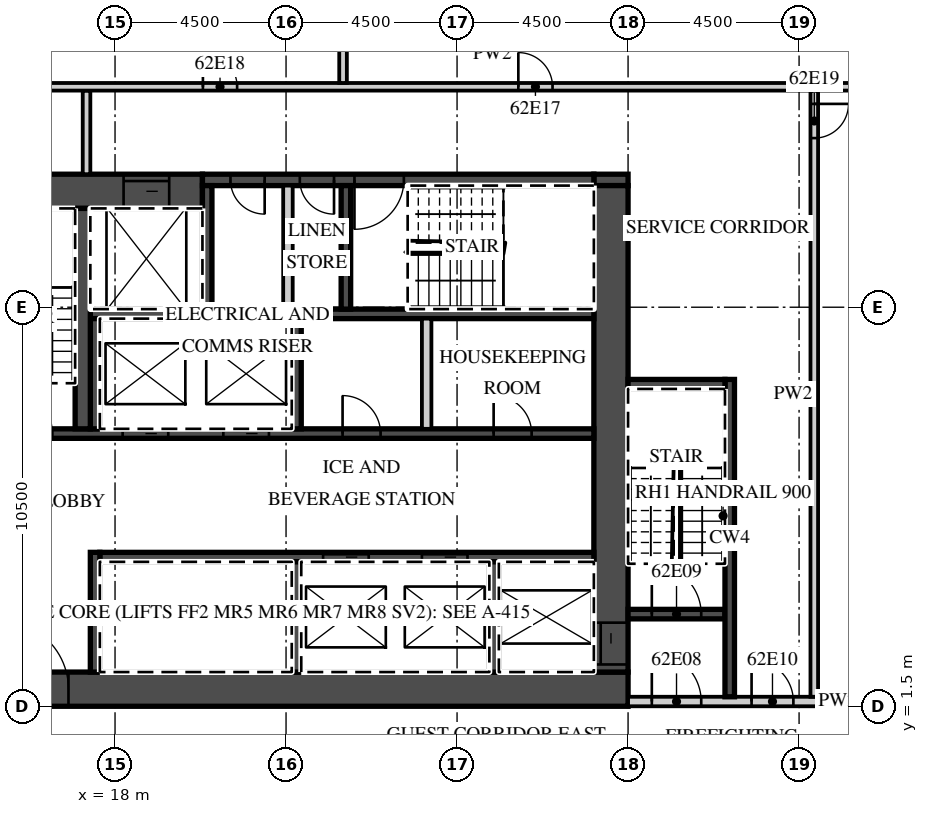
"""IFC4 building model, lengths in metres.
Left out: names, types, materials, properties, quantities, classifications, styles, units other than length and angle.
Written with IfcOpenShell. Run it as: python <this file> out.ifc"""

import sys

from ifc_helpers import new_model, si_unit, direction, frame, frame_2d, origin, place, context, subcontext, project, spatial, rectangle, extrude, element, fill, save


model = new_model("IFC4")
c1 = context("Model", 3, precision=1e-05, world=origin(), true_north=direction((0.0, 1.0)))
c2 = subcontext(c1, "Body", "Model", "MODEL_VIEW")
j1 = project(units=[si_unit("LENGTHUNIT", "METRE"), si_unit("PLANEANGLEUNIT", "RADIAN")], contexts=[c1])
p1 = place(None, origin())
s1 = spatial("IfcSite", under=j1, at=p1, CompositionType="ELEMENT")
p2 = place(p1, origin())
s2 = spatial("IfcBuilding", under=s1, at=p2, CompositionType="ELEMENT")
p3 = place(p2, frame((0.0, 0.0, 250.7)))
s3 = spatial("IfcBuildingStorey", under=s2, at=p3, CompositionType="ELEMENT", Elevation=250.7)
p4 = place(p3, frame((13.5, 1.95, 0.0), z_axis=(0.0, 0.0, 1.0), x_axis=(1.0, 0.0, 0.0)))
e1 = element("IfcWall", 1, at=p4, inside=s3, PredefinedType="SHEAR", context=c2, shape_type="SweptSolid", body=[
    extrude(rectangle(XDim=18.0, YDim=0.9, at=frame_2d((9.0, 0.0))), origin(), (0.0, 0.0, 1.0), 3.02),
])
p5 = place(p4, frame((1.475, 0.0, 0.0)))
e2 = element("IfcOpeningElement", 2, at=p5, cuts=e1, PredefinedType="OPENING", context=c2, shape_type="SweptSolid", body=[
    extrude(rectangle(XDim=1.8, YDim=2.1, at=frame_2d((0.9, 1.05))), frame((0.0, 0.46, 0.0), z_axis=(0.0, -1.0, 0.0), x_axis=(1.0, 0.0, 0.0)), (0.0, 0.0, 1.0), 0.92),
])
p6 = place(p3, frame((13.5, 15.05, 0.0), z_axis=(0.0, 0.0, 1.0), x_axis=(1.0, 0.0, 0.0)))
e3 = element("IfcWall", 3, at=p6, inside=s3, PredefinedType="SHEAR", context=c2, shape_type="SweptSolid", body=[
    extrude(rectangle(XDim=6.8, YDim=0.9, at=frame_2d((3.4, 0.0))), origin(), (0.0, 0.0, 1.0), 3.02),
])
p7 = place(p6, frame((4.725, 0.0, 0.0)))
e4 = element("IfcOpeningElement", 4, at=p7, cuts=e3, PredefinedType="OPENING", context=c2, shape_type="SweptSolid", body=[
    extrude(rectangle(XDim=1.2, YDim=2.1, at=frame_2d((0.6, 1.05))), frame((0.0, 0.46, 0.0), z_axis=(0.0, -1.0, 0.0), x_axis=(1.0, 0.0, 0.0)), (0.0, 0.0, 1.0), 0.92),
])
p8 = place(p3, frame((30.6, 15.35, 0.0), z_axis=(0.0, 0.0, 1.0), x_axis=(1.0, 0.0, 0.0)))
e5 = element("IfcWall", 5, at=p8, inside=s3, PredefinedType="SHEAR", context=c2, shape_type="SweptSolid", body=[
    extrude(rectangle(XDim=0.9, YDim=0.3, at=frame_2d((0.45, 0.0))), origin(), (0.0, 0.0, 1.0), 3.02),
])
p9 = place(p3, frame((20.3, 15.35, 0.0), z_axis=(0.0, 0.0, 1.0), x_axis=(1.0, 0.0, 0.0)))
e6 = element("IfcWall", 6, at=p9, inside=s3, PredefinedType="SHEAR", context=c2, shape_type="SweptSolid", body=[
    extrude(rectangle(XDim=10.3, YDim=0.3, at=frame_2d((5.15, 0.0))), origin(), (0.0, 0.0, 1.0), 3.02),
])
p10 = place(p9, frame((4.0, 0.0, 0.0)))
e7 = element("IfcOpeningElement", 7, at=p10, cuts=e6, PredefinedType="OPENING", context=c2, shape_type="SweptSolid", body=[
    extrude(rectangle(XDim=1.3, YDim=2.1, at=frame_2d((0.65, 1.05))), frame((0.0, 0.16, 0.0), z_axis=(0.0, -1.0, 0.0), x_axis=(1.0, 0.0, 0.0)), (0.0, 0.0, 1.0), 0.32),
])
p11 = place(p9, frame((2.562, 0.0, 0.0)))
e8 = element("IfcOpeningElement", 8, at=p11, cuts=e6, PredefinedType="OPENING", context=c2, shape_type="SweptSolid", body=[
    extrude(rectangle(XDim=0.9, YDim=2.1, at=frame_2d((0.45, 1.05))), frame((0.0, 0.16, 0.0), z_axis=(0.0, -1.0, 0.0), x_axis=(1.0, 0.0, 0.0)), (0.0, 0.0, 1.0), 0.32),
])
p12 = place(p9, frame((0.738, 0.0, 0.0)))
e9 = element("IfcOpeningElement", 9, at=p12, cuts=e6, PredefinedType="OPENING", context=c2, shape_type="SweptSolid", body=[
    extrude(rectangle(XDim=0.9, YDim=2.1, at=frame_2d((0.45, 1.05))), frame((0.0, 0.16, 0.0), z_axis=(0.0, -1.0, 0.0), x_axis=(1.0, 0.0, 0.0)), (0.0, 0.0, 1.0), 0.32),
])
p13 = place(p3, frame((31.05, 2.4, 0.0), z_axis=(0.0, 0.0, 1.0), x_axis=(0.0, 1.0, 0.0)))
e10 = element("IfcWall", 10, at=p13, inside=s3, PredefinedType="SHEAR", context=c2, shape_type="SweptSolid", body=[
    extrude(rectangle(XDim=12.8, YDim=0.9, at=frame_2d((6.4, 0.0))), origin(), (0.0, 0.0, 1.0), 3.02),
])
p14 = place(p13, frame((0.2, 0.0, 0.0)))
e11 = element("IfcOpeningElement", 11, at=p14, cuts=e10, PredefinedType="OPENING", context=c2, shape_type="SweptSolid", body=[
    extrude(rectangle(XDim=1.1, YDim=2.1, at=frame_2d((0.55, 1.05))), frame((0.0, 0.46, 0.0), z_axis=(0.0, -1.0, 0.0), x_axis=(1.0, 0.0, 0.0)), (0.0, 0.0, 1.0), 0.92),
])
p15 = place(p3, frame((17.6, 5.425, 0.0), z_axis=(0.0, 0.0, 1.0), x_axis=(1.0, 0.0, 0.0)))
e12 = element("IfcWall", 12, at=p15, inside=s3, PredefinedType="SHEAR", context=c2, shape_type="SweptSolid", body=[
    extrude(rectangle(XDim=13.0, YDim=0.25, at=frame_2d((6.5, 0.0))), origin(), (0.0, 0.0, 1.0), 3.02),
])
p16 = place(p15, frame((8.475, 0.0, 0.0)))
e13 = element("IfcOpeningElement", 13, at=p16, cuts=e12, PredefinedType="OPENING", context=c2, shape_type="SweptSolid", body=[
    extrude(rectangle(XDim=1.2, YDim=2.1, at=frame_2d((0.6, 1.05))), frame((0.0, 0.135, 0.0), z_axis=(0.0, -1.0, 0.0), x_axis=(1.0, 0.0, 0.0)), (0.0, 0.0, 1.0), 0.27),
])
p17 = place(p15, frame((5.875, 0.0, 0.0)))
e14 = element("IfcOpeningElement", 14, at=p17, cuts=e12, PredefinedType="OPENING", context=c2, shape_type="SweptSolid", body=[
    extrude(rectangle(XDim=1.2, YDim=2.1, at=frame_2d((0.6, 1.05))), frame((0.0, 0.135, 0.0), z_axis=(0.0, -1.0, 0.0), x_axis=(1.0, 0.0, 0.0)), (0.0, 0.0, 1.0), 0.27),
])
p18 = place(p3, frame((17.475, 2.4, 0.0), z_axis=(0.0, 0.0, 1.0), x_axis=(0.0, 1.0, 0.0)))
e15 = element("IfcWall", 15, at=p18, inside=s3, PredefinedType="SHEAR", context=c2, shape_type="SweptSolid", body=[
    extrude(rectangle(XDim=3.15, YDim=0.25, at=frame_2d((1.575, 0.0))), origin(), (0.0, 0.0, 1.0), 3.02),
])
for number, where, z_axis, x_axis in (
    (16, (27.975, 2.4, 0.0), (0.0, 0.0, 1.0), (0.0, 1.0, 0.0)),
    (17, (22.775, 2.4, 0.0), (0.0, 0.0, 1.0), (0.0, 1.0, 0.0)),
):
    element("IfcWall", number, at=place(p3, frame(where, z_axis=z_axis, x_axis=x_axis)), inside=s3, PredefinedType="SHEAR", context=c2, shape_type="SweptSolid", body=[
        extrude(rectangle(XDim=2.9, YDim=0.25, at=frame_2d((1.45, 0.0))), origin(), (0.0, 0.0, 1.0), 3.02),
    ])
p19 = place(p3, frame((14.4, 8.675, 0.0), z_axis=(0.0, 0.0, 1.0), x_axis=(1.0, 0.0, 0.0)))
e18 = element("IfcWall", 18, at=p19, inside=s3, PredefinedType="SHEAR", context=c2, shape_type="SweptSolid", body=[
    extrude(rectangle(XDim=16.2, YDim=0.25, at=frame_2d((8.1, 0.0))), origin(), (0.0, 0.0, 1.0), 3.02),
])
p20 = place(p19, frame((6.45, 0.0, 0.0)))
e19 = element("IfcOpeningElement", 19, at=p20, cuts=e18, PredefinedType="OPENING", context=c2, shape_type="SweptSolid", body=[
    extrude(rectangle(XDim=1.2, YDim=2.1, at=frame_2d((0.6, 1.05))), frame((0.0, 0.135, 0.0), z_axis=(0.0, -1.0, 0.0), x_axis=(1.0, 0.0, 0.0)), (0.0, 0.0, 1.0), 0.27),
])
p21 = place(p19, frame((3.8, 0.0, 0.0)))
e20 = element("IfcOpeningElement", 20, at=p21, cuts=e18, PredefinedType="OPENING", context=c2, shape_type="SweptSolid", body=[
    extrude(rectangle(XDim=1.2, YDim=2.1, at=frame_2d((0.6, 1.05))), frame((0.0, 0.135, 0.0), z_axis=(0.0, -1.0, 0.0), x_axis=(1.0, 0.0, 0.0)), (0.0, 0.0, 1.0), 0.27),
])
p22 = place(p19, frame((0.65, 0.0, 0.0)))
e21 = element("IfcOpeningElement", 21, at=p22, cuts=e18, PredefinedType="OPENING", context=c2, shape_type="SweptSolid", body=[
    extrude(rectangle(XDim=1.3, YDim=2.1, at=frame_2d((0.65, 1.05))), frame((0.0, 0.135, 0.0), z_axis=(0.0, -1.0, 0.0), x_axis=(1.0, 0.0, 0.0)), (0.0, 0.0, 1.0), 0.27),
])
p23 = place(p19, frame((13.562, 0.0, 0.0)))
e22 = element("IfcOpeningElement", 22, at=p23, cuts=e18, PredefinedType="OPENING", context=c2, shape_type="SweptSolid", body=[
    extrude(rectangle(XDim=1.0, YDim=2.1, at=frame_2d((0.5, 1.05))), frame((0.0, 0.135, 0.0), z_axis=(0.0, -1.0, 0.0), x_axis=(1.0, 0.0, 0.0)), (0.0, 0.0, 1.0), 0.27),
])
p24 = place(p19, frame((9.587, 0.0, 0.0)))
e23 = element("IfcOpeningElement", 23, at=p24, cuts=e18, PredefinedType="OPENING", context=c2, shape_type="SweptSolid", body=[
    extrude(rectangle(XDim=1.0, YDim=2.1, at=frame_2d((0.5, 1.05))), frame((0.0, 0.135, 0.0), z_axis=(0.0, -1.0, 0.0), x_axis=(1.0, 0.0, 0.0)), (0.0, 0.0, 1.0), 0.27),
])
p25 = place(p3, frame((17.35, 11.825, 0.0), z_axis=(0.0, 0.0, 1.0), x_axis=(1.0, 0.0, 0.0)))
e24 = element("IfcWall", 24, at=p25, inside=s3, PredefinedType="SHEAR", context=c2, shape_type="SweptSolid", body=[
    extrude(rectangle(XDim=13.25, YDim=0.25, at=frame_2d((6.625, 0.0))), origin(), (0.0, 0.0, 1.0), 3.02),
])
for number, where, z_axis, x_axis in (
    (25, (17.475, 8.8, 0.0), (0.0, 0.0, 1.0), (0.0, 1.0, 0.0)),
    (26, (22.775, 8.8, 0.0), (0.0, 0.0, 1.0), (0.0, 1.0, 0.0)),
):
    element("IfcWall", number, at=place(p3, frame(where, z_axis=z_axis, x_axis=x_axis)), inside=s3, PredefinedType="SHEAR", context=c2, shape_type="SweptSolid", body=[
        extrude(rectangle(XDim=2.9, YDim=0.25, at=frame_2d((1.45, 0.0))), origin(), (0.0, 0.0, 1.0), 3.02),
    ])
p26 = place(p3, frame((26.2, 8.8, 0.0), z_axis=(0.0, 0.0, 1.0), x_axis=(0.0, 1.0, 0.0)))
e27 = element("IfcWall", 27, at=p26, inside=s3, PredefinedType="PARTITIONING", context=c2, shape_type="SweptSolid", body=[
    extrude(rectangle(XDim=2.9, YDim=0.25, at=frame_2d((1.45, 0.0))), origin(), (0.0, 0.0, 1.0), 3.02),
])
p27 = place(p3, frame((17.15, 8.8, 0.0), z_axis=(0.0, 0.0, 1.0), x_axis=(0.0, 1.0, 0.0)))
e28 = element("IfcWall", 28, at=p27, inside=s3, PredefinedType="SHEAR", context=c2, shape_type="SweptSolid", body=[
    extrude(rectangle(XDim=5.8, YDim=0.4, at=frame_2d((2.9, 0.0))), origin(), (0.0, 0.0, 1.0), 3.02),
])
for number, where, z_axis, x_axis in (
    (29, (20.425, 11.95, 0.0), (0.0, 0.0, 1.0), (0.0, 1.0, 0.0)),
    (30, (24.075, 11.95, 0.0), (0.0, 0.0, 1.0), (0.0, 1.0, 0.0)),
):
    element("IfcWall", number, at=place(p3, frame(where, z_axis=z_axis, x_axis=x_axis)), inside=s3, PredefinedType="SHEAR", context=c2, shape_type="SweptSolid", body=[
        extrude(rectangle(XDim=3.25, YDim=0.25, at=frame_2d((1.625, 0.0))), origin(), (0.0, 0.0, 1.0), 3.02),
    ])
p28 = place(p3, frame((22.55, 11.95, 0.0), z_axis=(0.0, 0.0, 1.0), x_axis=(0.0, 1.0, 0.0)))
e31 = element("IfcWall", 31, at=p28, inside=s3, PredefinedType="PARTITIONING", context=c2, shape_type="SweptSolid", body=[
    extrude(rectangle(XDim=3.25, YDim=0.25, at=frame_2d((1.625, 0.0))), origin(), (0.0, 0.0, 1.0), 3.02),
])
p29 = place(p3, frame((31.5, 1.625, 0.0), z_axis=(0.0, 0.0, 1.0), x_axis=(1.0, 0.0, 0.0)))
e32 = element("IfcWall", 32, at=p29, inside=s3, PredefinedType="PARTITIONING", context=c2, shape_type="SweptSolid", body=[
    extrude(rectangle(XDim=11.04, YDim=0.25, at=frame_2d((5.52, 0.0))), origin(), (0.0, 0.0, 1.0), 3.02),
])
p30 = place(p29, frame((0.625, 0.0, 0.0)))
e33 = element("IfcOpeningElement", 33, at=p30, cuts=e32, PredefinedType="OPENING", context=c2, shape_type="SweptSolid", body=[
    extrude(rectangle(XDim=1.3, YDim=2.1, at=frame_2d((0.65, 1.05))), frame((0.0, 0.135, 0.0), z_axis=(0.0, -1.0, 0.0), x_axis=(1.0, 0.0, 0.0)), (0.0, 0.0, 1.0), 0.27),
])
p31 = place(p29, frame((3.25, 0.0, 0.0)))
e34 = element("IfcOpeningElement", 34, at=p31, cuts=e32, PredefinedType="OPENING", context=c2, shape_type="SweptSolid", body=[
    extrude(rectangle(XDim=1.1, YDim=2.1, at=frame_2d((0.55, 1.05))), frame((0.0, 0.135, 0.0), z_axis=(0.0, -1.0, 0.0), x_axis=(1.0, 0.0, 0.0)), (0.0, 0.0, 1.0), 0.27),
])
p32 = place(p3, frame((31.5, 3.925, 0.0), z_axis=(0.0, 0.0, 1.0), x_axis=(1.0, 0.0, 0.0)))
e35 = element("IfcWall", 35, at=p32, inside=s3, PredefinedType="SHEAR", context=c2, shape_type="SweptSolid", body=[
    extrude(rectangle(XDim=2.55, YDim=0.25, at=frame_2d((1.275, 0.0))), origin(), (0.0, 0.0, 1.0), 3.02),
])
p33 = place(p32, frame((0.625, 0.0, 0.0)))
e36 = element("IfcOpeningElement", 36, at=p33, cuts=e35, PredefinedType="OPENING", context=c2, shape_type="SweptSolid", body=[
    extrude(rectangle(XDim=1.3, YDim=2.1, at=frame_2d((0.65, 1.05))), frame((0.0, 0.135, 0.0), z_axis=(0.0, -1.0, 0.0), x_axis=(1.0, 0.0, 0.0)), (0.0, 0.0, 1.0), 0.27),
])
p34 = place(p3, frame((34.175, 1.75, 0.0), z_axis=(0.0, 0.0, 1.0), x_axis=(0.0, 1.0, 0.0)))
e37 = element("IfcWall", 37, at=p34, inside=s3, PredefinedType="SHEAR", context=c2, shape_type="SweptSolid", body=[
    extrude(rectangle(XDim=8.35, YDim=0.25, at=frame_2d((4.175, 0.0))), origin(), (0.0, 0.0, 1.0), 3.02),
])
p35 = place(p3, frame((31.5, 9.975, 0.0), z_axis=(0.0, 0.0, 1.0), x_axis=(1.0, 0.0, 0.0)))
e38 = element("IfcWall", 38, at=p35, inside=s3, PredefinedType="SHEAR", context=c2, shape_type="SweptSolid", body=[
    extrude(rectangle(XDim=2.55, YDim=0.25, at=frame_2d((1.275, 0.0))), origin(), (0.0, 0.0, 1.0), 3.02),
])
p36 = place(p3, frame((17.25, 15.5, 0.0), z_axis=(0.0, 0.0, 1.0), x_axis=(0.0, 1.0, 0.0)))
e39 = element("IfcWall", 39, at=p36, inside=s3, PredefinedType="PARTITIONING", context=c2, shape_type="SweptSolid", body=[
    extrude(rectangle(XDim=2.2, YDim=0.2, at=frame_2d((1.1, 0.0))), origin(), (0.0, 0.0, 1.0), 3.02),
])
p37 = place(p3, frame((36.4, 1.75, 0.0), z_axis=(0.0, 0.0, 1.0), x_axis=(0.0, 1.0, 0.0)))
e40 = element("IfcWall", 40, at=p37, inside=s3, PredefinedType="PARTITIONING", context=c2, shape_type="SweptSolid", body=[
    extrude(rectangle(XDim=15.95, YDim=0.2, at=frame_2d((7.975, 0.0))), origin(), (0.0, 0.0, 1.0), 3.02),
])
p38 = place(p37, frame((14.7, 0.0, 0.0)))
e41 = element("IfcOpeningElement", 41, at=p38, cuts=e40, PredefinedType="OPENING", context=c2, shape_type="SweptSolid", body=[
    extrude(rectangle(XDim=0.9, YDim=2.1, at=frame_2d((0.45, 1.05))), frame((0.0, 0.11, 0.0), z_axis=(0.0, -1.0, 0.0), x_axis=(1.0, 0.0, 0.0)), (0.0, 0.0, 1.0), 0.22),
])
p39 = place(p3, frame((13.6, 17.8, 0.0), z_axis=(0.0, 0.0, 1.0), x_axis=(1.0, 0.0, 0.0)))
e42 = element("IfcWall", 42, at=p39, inside=s3, PredefinedType="PARTITIONING", context=c2, shape_type="SweptSolid", body=[
    extrude(rectangle(XDim=28.657, YDim=0.2, at=frame_2d((14.329, 0.0))), origin(), (0.0, 0.0, 1.0), 3.02),
])
p40 = place(p39, frame((15.012, 0.0, 0.0)))
e43 = element("IfcOpeningElement", 43, at=p40, cuts=e42, PredefinedType="OPENING", context=c2, shape_type="SweptSolid", body=[
    extrude(rectangle(XDim=0.9, YDim=2.1, at=frame_2d((0.45, 1.05))), frame((0.0, 0.11, 0.0), z_axis=(0.0, -1.0, 0.0), x_axis=(1.0, 0.0, 0.0)), (0.0, 0.0, 1.0), 0.22),
])
p41 = place(p39, frame((6.712, 0.0, 0.0)))
e44 = element("IfcOpeningElement", 44, at=p41, cuts=e42, PredefinedType="OPENING", context=c2, shape_type="SweptSolid", body=[
    extrude(rectangle(XDim=0.9, YDim=2.1, at=frame_2d((0.45, 1.05))), frame((0.0, 0.11, 0.0), z_axis=(0.0, -1.0, 0.0), x_axis=(1.0, 0.0, 0.0)), (0.0, 0.0, 1.0), 0.22),
])
p42 = place(p3, frame((24.0, 17.9, 0.0), z_axis=(0.0, 0.0, 1.0), x_axis=(0.0, 1.0, 0.0)))
e45 = element("IfcWall", 45, at=p42, inside=s3, PredefinedType="PARTITIONING", context=c2, shape_type="SweptSolid", body=[
    extrude(rectangle(XDim=3.22, YDim=0.2, at=frame_2d((1.61, 0.0))), origin(), (0.0, 0.0, 1.0), 3.02),
])
p43 = place(p20, origin())
e46 = element("IfcDoor", 46, at=p43, inside=s3, OperationType="SLIDING_TO_LEFT", PredefinedType="DOOR", context=c2, shape_type="SweptSolid", body=[
    extrude(rectangle(XDim=1.2, YDim=2.1, at=frame_2d((0.6, 1.05))), frame((0.0, 0.025, 0.0), z_axis=(0.0, -1.0, 0.0), x_axis=(1.0, 0.0, 0.0)), (0.0, 0.0, 1.0), 0.05),
])
fill(e19, e46)
p44 = place(p21, origin())
e47 = element("IfcDoor", 47, at=p44, inside=s3, OperationType="SLIDING_TO_RIGHT", PredefinedType="DOOR", context=c2, shape_type="SweptSolid", body=[
    extrude(rectangle(XDim=1.2, YDim=2.1, at=frame_2d((0.6, 1.05))), frame((0.0, 0.025, 0.0), z_axis=(0.0, -1.0, 0.0), x_axis=(1.0, 0.0, 0.0)), (0.0, 0.0, 1.0), 0.05),
])
fill(e20, e47)
p45 = place(p16, origin())
e48 = element("IfcDoor", 48, at=p45, inside=s3, OperationType="SLIDING_TO_LEFT", PredefinedType="DOOR", context=c2, shape_type="SweptSolid", body=[
    extrude(rectangle(XDim=1.2, YDim=2.1, at=frame_2d((0.6, 1.05))), frame((0.0, 0.025, 0.0), z_axis=(0.0, -1.0, 0.0), x_axis=(1.0, 0.0, 0.0)), (0.0, 0.0, 1.0), 0.05),
])
fill(e13, e48)
p46 = place(p17, origin())
e49 = element("IfcDoor", 49, at=p46, inside=s3, OperationType="SLIDING_TO_RIGHT", PredefinedType="DOOR", context=c2, shape_type="SweptSolid", body=[
    extrude(rectangle(XDim=1.2, YDim=2.1, at=frame_2d((0.6, 1.05))), frame((0.0, 0.025, 0.0), z_axis=(0.0, -1.0, 0.0), x_axis=(1.0, 0.0, 0.0)), (0.0, 0.0, 1.0), 0.05),
])
fill(e14, e49)
p47 = place(p7, origin())
e50 = element("IfcDoor", 50, at=p47, inside=s3, OperationType="SLIDING_TO_LEFT", PredefinedType="DOOR", context=c2, shape_type="SweptSolid", body=[
    extrude(rectangle(XDim=1.2, YDim=2.1, at=frame_2d((0.6, 1.05))), frame((0.0, 0.025, 0.0), z_axis=(0.0, -1.0, 0.0), x_axis=(1.0, 0.0, 0.0)), (0.0, 0.0, 1.0), 0.05),
])
fill(e4, e50)
p48 = place(p14, origin())
e51 = element("IfcDoor", 51, at=p48, inside=s3, OperationType="SLIDING_TO_LEFT", PredefinedType="DOOR", context=c2, shape_type="SweptSolid", body=[
    extrude(rectangle(XDim=1.1, YDim=2.1, at=frame_2d((0.55, 1.05))), frame((0.0, 0.025, 0.0), z_axis=(0.0, -1.0, 0.0), x_axis=(1.0, 0.0, 0.0)), (0.0, 0.0, 1.0), 0.05),
])
fill(e11, e51)
p49 = place(p5, origin())
e52 = element("IfcDoor", 52, at=p49, inside=s3, OperationType="DOUBLE_DOOR_DOUBLE_SWING", PredefinedType="DOOR", context=c2, shape_type="SweptSolid", body=[
    extrude(rectangle(XDim=1.8, YDim=2.1, at=frame_2d((0.9, 1.05))), frame((0.0, 0.025, 0.0), z_axis=(0.0, -1.0, 0.0), x_axis=(1.0, 0.0, 0.0)), (0.0, 0.0, 1.0), 0.05),
])
fill(e2, e52)
p50 = place(p30, origin())
e53 = element("IfcDoor", 53, at=p50, inside=s3, OperationType="SINGLE_SWING_LEFT", PredefinedType="DOOR", context=c2, shape_type="SweptSolid", body=[
    extrude(rectangle(XDim=1.3, YDim=2.1, at=frame_2d((0.65, 1.05))), frame((0.0, 0.025, 0.0), z_axis=(0.0, -1.0, 0.0), x_axis=(1.0, 0.0, 0.0)), (0.0, 0.0, 1.0), 0.05),
])
fill(e33, e53)
p51 = place(p33, origin())
e54 = element("IfcDoor", 54, at=p51, inside=s3, OperationType="SINGLE_SWING_LEFT", PredefinedType="DOOR", context=c2, shape_type="SweptSolid", body=[
    extrude(rectangle(XDim=1.3, YDim=2.1, at=frame_2d((0.65, 1.05))), frame((0.0, 0.025, 0.0), z_axis=(0.0, -1.0, 0.0), x_axis=(1.0, 0.0, 0.0)), (0.0, 0.0, 1.0), 0.05),
])
fill(e36, e54)
p52 = place(p31, origin())
e55 = element("IfcDoor", 55, at=p52, inside=s3, OperationType="SINGLE_SWING_LEFT", PredefinedType="DOOR", context=c2, shape_type="SweptSolid", body=[
    extrude(rectangle(XDim=1.1, YDim=2.1, at=frame_2d((0.55, 1.05))), frame((0.0, 0.025, 0.0), z_axis=(0.0, -1.0, 0.0), x_axis=(1.0, 0.0, 0.0)), (0.0, 0.0, 1.0), 0.05),
])
fill(e34, e55)
p53 = place(p10, origin())
e56 = element("IfcDoor", 56, at=p53, inside=s3, OperationType="SINGLE_SWING_LEFT", PredefinedType="DOOR", context=c2, shape_type="SweptSolid", body=[
    extrude(rectangle(XDim=1.3, YDim=2.1, at=frame_2d((0.65, 1.05))), frame((0.0, 0.025, 0.0), z_axis=(0.0, -1.0, 0.0), x_axis=(1.0, 0.0, 0.0)), (0.0, 0.0, 1.0), 0.05),
])
fill(e7, e56)
p54 = place(p11, origin())
e57 = element("IfcDoor", 57, at=p54, inside=s3, OperationType="SINGLE_SWING_RIGHT", PredefinedType="DOOR", context=c2, shape_type="SweptSolid", body=[
    extrude(rectangle(XDim=0.9, YDim=2.1, at=frame_2d((0.45, 1.05))), frame((0.0, 0.025, 0.0), z_axis=(0.0, -1.0, 0.0), x_axis=(1.0, 0.0, 0.0)), (0.0, 0.0, 1.0), 0.05),
])
fill(e8, e57)
p55 = place(p12, origin())
e58 = element("IfcDoor", 58, at=p55, inside=s3, OperationType="SINGLE_SWING_RIGHT", PredefinedType="DOOR", context=c2, shape_type="SweptSolid", body=[
    extrude(rectangle(XDim=0.9, YDim=2.1, at=frame_2d((0.45, 1.05))), frame((0.0, 0.025, 0.0), z_axis=(0.0, -1.0, 0.0), x_axis=(1.0, 0.0, 0.0)), (0.0, 0.0, 1.0), 0.05),
])
fill(e9, e58)
p56 = place(p23, origin())
e59 = element("IfcDoor", 59, at=p56, inside=s3, OperationType="SINGLE_SWING_LEFT", PredefinedType="DOOR", context=c2, shape_type="SweptSolid", body=[
    extrude(rectangle(XDim=1.0, YDim=2.1, at=frame_2d((0.5, 1.05))), frame((0.0, 0.025, 0.0), z_axis=(0.0, -1.0, 0.0), x_axis=(1.0, 0.0, 0.0)), (0.0, 0.0, 1.0), 0.05),
])
fill(e22, e59)
p57 = place(p24, origin())
e60 = element("IfcDoor", 60, at=p57, inside=s3, OperationType="SINGLE_SWING_LEFT", PredefinedType="DOOR", context=c2, shape_type="SweptSolid", body=[
    extrude(rectangle(XDim=1.0, YDim=2.1, at=frame_2d((0.5, 1.05))), frame((0.0, 0.025, 0.0), z_axis=(0.0, -1.0, 0.0), x_axis=(1.0, 0.0, 0.0)), (0.0, 0.0, 1.0), 0.05),
])
fill(e23, e60)
p58 = place(p40, origin())
e61 = element("IfcDoor", 61, at=p58, inside=s3, OperationType="SINGLE_SWING_LEFT", PredefinedType="DOOR", context=c2, shape_type="SweptSolid", body=[
    extrude(rectangle(XDim=0.9, YDim=2.1, at=frame_2d((0.45, 1.05))), frame((0.0, 0.025, 0.0), z_axis=(0.0, -1.0, 0.0), x_axis=(1.0, 0.0, 0.0)), (0.0, 0.0, 1.0), 0.05),
])
fill(e43, e61)
p59 = place(p41, origin())
e62 = element("IfcDoor", 62, at=p59, inside=s3, OperationType="SINGLE_SWING_LEFT", PredefinedType="DOOR", context=c2, shape_type="SweptSolid", body=[
    extrude(rectangle(XDim=0.9, YDim=2.1, at=frame_2d((0.45, 1.05))), frame((0.0, 0.025, 0.0), z_axis=(0.0, -1.0, 0.0), x_axis=(1.0, 0.0, 0.0)), (0.0, 0.0, 1.0), 0.05),
])
fill(e44, e62)
p60 = place(p38, origin())
e63 = element("IfcDoor", 63, at=p60, inside=s3, OperationType="SINGLE_SWING_RIGHT", PredefinedType="DOOR", context=c2, shape_type="SweptSolid", body=[
    extrude(rectangle(XDim=0.9, YDim=2.1, at=frame_2d((0.45, 1.05))), frame((0.0, 0.025, 0.0), z_axis=(0.0, -1.0, 0.0), x_axis=(1.0, 0.0, 0.0)), (0.0, 0.0, 1.0), 0.05),
])
fill(e41, e63)
save(model, sys.argv[1])
